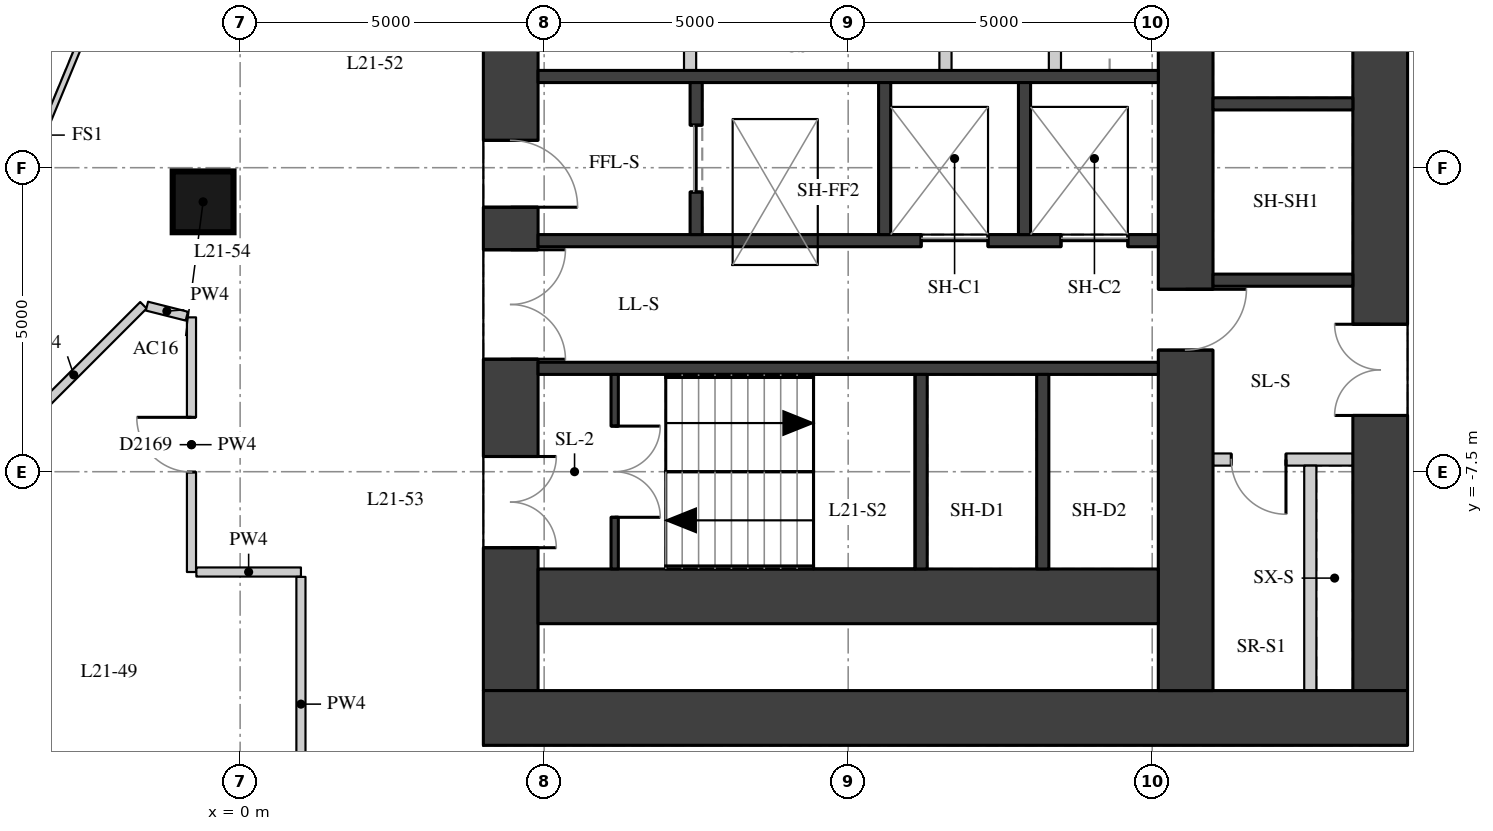
"""IFC4 building model, lengths in metres.
Left out: names, types, materials, properties, quantities, classifications, styles, units other than length and angle.
Written with IfcOpenShell. Run it as: python <this file> out.ifc"""

import sys

from ifc_helpers import new_model, si_unit, direction, frame, frame_2d, origin, origin_2d, place, context, subcontext, project, spatial, rectangle, extrude, element, fill, save


model = new_model("IFC4")
c1 = context("Model", 3, precision=1e-05, world=origin(), true_north=direction((0.0, 1.0)))
c2 = subcontext(c1, "Body", "Model", "MODEL_VIEW")
j1 = project(units=[si_unit("LENGTHUNIT", "METRE"), si_unit("PLANEANGLEUNIT", "RADIAN")], contexts=[c1])
p1 = place(None, origin())
s1 = spatial("IfcSite", under=j1, at=p1, CompositionType="ELEMENT")
p2 = place(p1, origin())
s2 = spatial("IfcBuilding", under=s1, at=p2, CompositionType="ELEMENT")
p3 = place(p2, frame((0.0, 0.0, 77.8)))
s3 = spatial("IfcBuildingStorey", under=s2, at=p3, CompositionType="ELEMENT", Elevation=77.8)
p4 = place(p3, frame((-0.609, -3.062, 0.0), z_axis=(0.0, 0.0, 1.0), x_axis=(1.0, 0.0, 0.0)))
e1 = element("IfcColumn", 1, at=p4, inside=s3, PredefinedType="COLUMN", context=c2, shape_type="SweptSolid", body=[
    extrude(rectangle(XDim=1.0, YDim=1.0, at=origin_2d()), origin(), (0.0, 0.0, 1.0), 3.3),
])
p5 = place(p3, frame((4.45, -11.1, 0.0), z_axis=(0.0, 0.0, 1.0), x_axis=(0.0, 1.0, 0.0)))
e2 = element("IfcWall", 2, at=p5, inside=s3, PredefinedType="SHEAR", context=c2, shape_type="SweptSolid", body=[
    extrude(rectangle(XDim=22.2, YDim=0.9, at=frame_2d((11.1, 0.0))), origin(), (0.0, 0.0, 1.0), 3.02),
])
p6 = place(p5, frame((2.35, 0.0, 0.0)))
e3 = element("IfcOpeningElement", 3, at=p6, cuts=e2, PredefinedType="OPENING", context=c2, shape_type="SweptSolid", body=[
    extrude(rectangle(XDim=1.5, YDim=2.1, at=frame_2d((0.75, 1.05))), frame((0.0, 0.46, 0.0), z_axis=(0.0, -1.0, 0.0), x_axis=(1.0, 0.0, 0.0)), (0.0, 0.0, 1.0), 0.92),
])
p7 = place(p5, frame((5.45, 0.0, 0.0)))
e4 = element("IfcOpeningElement", 4, at=p7, cuts=e2, PredefinedType="OPENING", context=c2, shape_type="SweptSolid", body=[
    extrude(rectangle(XDim=1.8, YDim=2.1, at=frame_2d((0.9, 1.05))), frame((0.0, 0.46, 0.0), z_axis=(0.0, -1.0, 0.0), x_axis=(1.0, 0.0, 0.0)), (0.0, 0.0, 1.0), 0.92),
])
p8 = place(p5, frame((7.95, 0.0, 0.0)))
e5 = element("IfcOpeningElement", 5, at=p8, cuts=e2, PredefinedType="OPENING", context=c2, shape_type="SweptSolid", body=[
    extrude(rectangle(XDim=1.1, YDim=2.1, at=frame_2d((0.55, 1.05))), frame((0.0, 0.46, 0.0), z_axis=(0.0, -1.0, 0.0), x_axis=(1.0, 0.0, 0.0)), (0.0, 0.0, 1.0), 0.92),
])
p9 = place(p5, frame((10.6, 0.0, 0.0)))
e6 = element("IfcOpeningElement", 6, at=p9, cuts=e2, PredefinedType="OPENING", context=c2, shape_type="SweptSolid", body=[
    extrude(rectangle(XDim=1.0, YDim=2.1, at=frame_2d((0.5, 1.05))), frame((0.0, 0.46, 0.0), z_axis=(0.0, -1.0, 0.0), x_axis=(1.0, 0.0, 0.0)), (0.0, 0.0, 1.0), 0.92),
])
p10 = place(p5, frame((13.15, 0.0, 0.0)))
e7 = element("IfcOpeningElement", 7, at=p10, cuts=e2, PredefinedType="OPENING", context=c2, shape_type="SweptSolid", body=[
    extrude(rectangle(XDim=1.1, YDim=2.1, at=frame_2d((0.55, 1.05))), frame((0.0, 0.46, 0.0), z_axis=(0.0, -1.0, 0.0), x_axis=(1.0, 0.0, 0.0)), (0.0, 0.0, 1.0), 0.92),
])
p11 = place(p5, frame((14.95, 0.0, 0.0)))
e8 = element("IfcOpeningElement", 8, at=p11, cuts=e2, PredefinedType="OPENING", context=c2, shape_type="SweptSolid", body=[
    extrude(rectangle(XDim=1.8, YDim=2.1, at=frame_2d((0.9, 1.05))), frame((0.0, 0.46, 0.0), z_axis=(0.0, -1.0, 0.0), x_axis=(1.0, 0.0, 0.0)), (0.0, 0.0, 1.0), 0.92),
])
p12 = place(p5, frame((18.35, 0.0, 0.0)))
e9 = element("IfcOpeningElement", 9, at=p12, cuts=e2, PredefinedType="OPENING", context=c2, shape_type="SweptSolid", body=[
    extrude(rectangle(XDim=1.5, YDim=2.1, at=frame_2d((0.75, 1.05))), frame((0.0, 0.46, 0.0), z_axis=(0.0, -1.0, 0.0), x_axis=(1.0, 0.0, 0.0)), (0.0, 0.0, 1.0), 0.92),
])
p13 = place(p3, frame((18.75, -11.1, 0.0), z_axis=(0.0, 0.0, 1.0), x_axis=(0.0, 1.0, 0.0)))
e10 = element("IfcWall", 10, at=p13, inside=s3, PredefinedType="SHEAR", context=c2, shape_type="SweptSolid", body=[
    extrude(rectangle(XDim=22.2, YDim=0.9, at=frame_2d((11.1, 0.0))), origin(), (0.0, 0.0, 1.0), 3.02),
])
p14 = place(p13, frame((15.925, 0.0, 0.0)))
e11 = element("IfcOpeningElement", 11, at=p14, cuts=e10, PredefinedType="OPENING", context=c2, shape_type="SweptSolid", body=[
    extrude(rectangle(XDim=1.5, YDim=2.1, at=frame_2d((0.75, 1.05))), frame((0.0, 0.46, 0.0), z_axis=(0.0, -1.0, 0.0), x_axis=(1.0, 0.0, 0.0)), (0.0, 0.0, 1.0), 0.92),
])
p15 = place(p13, frame((4.525, 0.0, 0.0)))
e12 = element("IfcOpeningElement", 12, at=p15, cuts=e10, PredefinedType="OPENING", context=c2, shape_type="SweptSolid", body=[
    extrude(rectangle(XDim=1.5, YDim=2.1, at=frame_2d((0.75, 1.05))), frame((0.0, 0.46, 0.0), z_axis=(0.0, -1.0, 0.0), x_axis=(1.0, 0.0, 0.0)), (0.0, 0.0, 1.0), 0.92),
])
p16 = place(p3, frame((4.0, -11.55, 0.0), z_axis=(0.0, 0.0, 1.0), x_axis=(1.0, 0.0, 0.0)))
e13 = element("IfcWall", 13, at=p16, inside=s3, PredefinedType="SHEAR", context=c2, shape_type="SweptSolid", body=[
    extrude(rectangle(XDim=15.2, YDim=0.9, at=frame_2d((7.6, 0.0))), origin(), (0.0, 0.0, 1.0), 3.02),
])
p17 = place(p3, frame((15.55, -11.1, 0.0), z_axis=(0.0, 0.0, 1.0), x_axis=(0.0, 1.0, 0.0)))
e14 = element("IfcWall", 14, at=p17, inside=s3, PredefinedType="SHEAR", context=c2, shape_type="SweptSolid", body=[
    extrude(rectangle(XDim=22.2, YDim=0.9, at=frame_2d((11.1, 0.0))), origin(), (0.0, 0.0, 1.0), 3.02),
])
p18 = place(p17, frame((15.6, 0.0, 0.0)))
e15 = element("IfcOpeningElement", 15, at=p18, cuts=e14, PredefinedType="OPENING", context=c2, shape_type="SweptSolid", body=[
    extrude(rectangle(XDim=1.0, YDim=2.1, at=frame_2d((0.5, 1.05))), frame((0.0, 0.46, 0.0), z_axis=(0.0, -1.0, 0.0), x_axis=(1.0, 0.0, 0.0)), (0.0, 0.0, 1.0), 0.92),
])
p19 = place(p17, frame((5.6, 0.0, 0.0)))
e16 = element("IfcOpeningElement", 16, at=p19, cuts=e14, PredefinedType="OPENING", context=c2, shape_type="SweptSolid", body=[
    extrude(rectangle(XDim=1.0, YDim=2.1, at=frame_2d((0.5, 1.05))), frame((0.0, 0.46, 0.0), z_axis=(0.0, -1.0, 0.0), x_axis=(1.0, 0.0, 0.0)), (0.0, 0.0, 1.0), 0.92),
])
p20 = place(p3, frame((4.9, -9.55, 0.0), z_axis=(0.0, 0.0, 1.0), x_axis=(1.0, 0.0, 0.0)))
e17 = element("IfcWall", 17, at=p20, inside=s3, PredefinedType="SHEAR", context=c2, shape_type="SweptSolid", body=[
    extrude(rectangle(XDim=10.2, YDim=0.9, at=frame_2d((5.1, 0.0))), origin(), (0.0, 0.0, 1.0), 3.02),
])
p21 = place(p3, frame((4.9, -1.0, 0.0), z_axis=(0.0, 0.0, 1.0), x_axis=(1.0, 0.0, 0.0)))
e18 = element("IfcWall", 18, at=p21, inside=s3, PredefinedType="SHEAR", context=c2, shape_type="SweptSolid", body=[
    extrude(rectangle(XDim=10.2, YDim=0.2, at=frame_2d((5.1, 0.0))), origin(), (0.0, 0.0, 1.0), 3.02),
])
p22 = place(p3, frame((4.9, -3.7, 0.0), z_axis=(0.0, 0.0, 1.0), x_axis=(1.0, 0.0, 0.0)))
e19 = element("IfcWall", 19, at=p22, inside=s3, PredefinedType="SHEAR", context=c2, shape_type="SweptSolid", body=[
    extrude(rectangle(XDim=10.2, YDim=0.2, at=frame_2d((5.1, 0.0))), origin(), (0.0, 0.0, 1.0), 3.02),
])
p23 = place(p22, frame((6.3, 0.0, 0.0)))
e20 = element("IfcOpeningElement", 20, at=p23, cuts=e19, PredefinedType="OPENING", context=c2, shape_type="SweptSolid", body=[
    extrude(rectangle(XDim=1.1, YDim=2.1, at=frame_2d((0.55, 1.05))), frame((0.0, 0.11, 0.0), z_axis=(0.0, -1.0, 0.0), x_axis=(1.0, 0.0, 0.0)), (0.0, 0.0, 1.0), 0.22),
])
p24 = place(p22, frame((8.6, 0.0, 0.0)))
e21 = element("IfcOpeningElement", 21, at=p24, cuts=e19, PredefinedType="OPENING", context=c2, shape_type="SweptSolid", body=[
    extrude(rectangle(XDim=1.1, YDim=2.1, at=frame_2d((0.55, 1.05))), frame((0.0, 0.11, 0.0), z_axis=(0.0, -1.0, 0.0), x_axis=(1.0, 0.0, 0.0)), (0.0, 0.0, 1.0), 0.22),
])
p25 = place(p3, frame((4.9, -5.8, 0.0), z_axis=(0.0, 0.0, 1.0), x_axis=(1.0, 0.0, 0.0)))
e22 = element("IfcWall", 22, at=p25, inside=s3, PredefinedType="SHEAR", context=c2, shape_type="SweptSolid", body=[
    extrude(rectangle(XDim=10.2, YDim=0.2, at=frame_2d((5.1, 0.0))), origin(), (0.0, 0.0, 1.0), 3.02),
])
for number, where, z_axis, x_axis in (
    (23, (11.2, -9.1, 0.0), (0.0, 0.0, 1.0), (0.0, 1.0, 0.0)),
    (24, (13.2, -9.1, 0.0), (0.0, 0.0, 1.0), (0.0, 1.0, 0.0)),
):
    element("IfcWall", number, at=place(p3, frame(where, z_axis=z_axis, x_axis=x_axis)), inside=s3, PredefinedType="SHEAR", context=c2, shape_type="SweptSolid", body=[
        extrude(rectangle(XDim=3.2, YDim=0.2, at=frame_2d((1.6, 0.0))), origin(), (0.0, 0.0, 1.0), 3.02),
    ])
p26 = place(p3, frame((7.5, -3.6, 0.0), z_axis=(0.0, 0.0, 1.0), x_axis=(0.0, 1.0, 0.0)))
e25 = element("IfcWall", 25, at=p26, inside=s3, PredefinedType="SHEAR", context=c2, shape_type="SweptSolid", body=[
    extrude(rectangle(XDim=2.5, YDim=0.2, at=frame_2d((1.25, 0.0))), origin(), (0.0, 0.0, 1.0), 3.02),
])
p27 = place(p26, frame((0.7, 0.0, 0.0)))
e26 = element("IfcOpeningElement", 26, at=p27, cuts=e25, PredefinedType="OPENING", context=c2, shape_type="SweptSolid", body=[
    extrude(rectangle(XDim=1.1, YDim=2.1, at=frame_2d((0.55, 1.05))), frame((0.0, 0.11, 0.0), z_axis=(0.0, -1.0, 0.0), x_axis=(1.0, 0.0, 0.0)), (0.0, 0.0, 1.0), 0.22),
])
for number, where, z_axis, x_axis in (
    (27, (10.6, -3.6, 0.0), (0.0, 0.0, 1.0), (0.0, 1.0, 0.0)),
    (28, (12.9, -3.6, 0.0), (0.0, 0.0, 1.0), (0.0, 1.0, 0.0)),
):
    element("IfcWall", number, at=place(p3, frame(where, z_axis=z_axis, x_axis=x_axis)), inside=s3, PredefinedType="SHEAR", context=c2, shape_type="SweptSolid", body=[
        extrude(rectangle(XDim=2.5, YDim=0.2, at=frame_2d((1.25, 0.0))), origin(), (0.0, 0.0, 1.0), 3.02),
    ])
p28 = place(p3, frame((6.16, -9.1, 0.0), z_axis=(0.0, 0.0, 1.0), x_axis=(0.0, 1.0, 0.0)))
e29 = element("IfcWall", 29, at=p28, inside=s3, PredefinedType="SHEAR", context=c2, shape_type="SweptSolid", body=[
    extrude(rectangle(XDim=3.2, YDim=0.12, at=frame_2d((1.6, 0.0))), origin(), (0.0, 0.0, 1.0), 3.02),
])
p29 = place(p28, frame((0.85, 0.0, 0.0)))
e30 = element("IfcOpeningElement", 30, at=p29, cuts=e29, PredefinedType="OPENING", context=c2, shape_type="SweptSolid", body=[
    extrude(rectangle(XDim=1.5, YDim=2.1, at=frame_2d((0.75, 1.05))), frame((0.0, 0.07, 0.0), z_axis=(0.0, -1.0, 0.0), x_axis=(1.0, 0.0, 0.0)), (0.0, 0.0, 1.0), 0.14),
])
p30 = place(p3, frame((7.4, -0.9, 0.0), z_axis=(0.0, 0.0, 1.0), x_axis=(0.0, 1.0, 0.0)))
e31 = element("IfcWall", 31, at=p30, inside=s3, PredefinedType="PARTITIONING", context=c2, shape_type="SweptSolid", body=[
    extrude(rectangle(XDim=1.8, YDim=0.2, at=frame_2d((0.9, 0.0))), origin(), (0.0, 0.0, 1.0), 3.02),
])
p31 = place(p30, frame((0.45, 0.0, 0.0)))
e32 = element("IfcOpeningElement", 32, at=p31, cuts=e31, PredefinedType="OPENING", context=c2, shape_type="SweptSolid", body=[
    extrude(rectangle(XDim=0.9, YDim=2.1, at=frame_2d((0.45, 1.05))), frame((0.0, 0.11, 0.0), z_axis=(0.0, -1.0, 0.0), x_axis=(1.0, 0.0, 0.0)), (0.0, 0.0, 1.0), 0.22),
])
for number, where, z_axis, x_axis in (
    (33, (11.6, -0.9, 0.0), (0.0, 0.0, 1.0), (0.0, 1.0, 0.0)),
    (34, (13.4, -0.9, 0.0), (0.0, 0.0, 1.0), (0.0, 1.0, 0.0)),
):
    element("IfcWall", number, at=place(p3, frame(where, z_axis=z_axis, x_axis=x_axis)), inside=s3, PredefinedType="PARTITIONING", context=c2, shape_type="SweptSolid", body=[
        extrude(rectangle(XDim=1.8, YDim=0.2, at=frame_2d((0.9, 0.0))), origin(), (0.0, 0.0, 1.0), 3.02),
    ])
for number, where, z_axis, x_axis in (
    (35, (16.0, -4.35, 0.0), (0.0, 0.0, 1.0), (1.0, 0.0, 0.0)),
    (36, (16.0, -1.45, 0.0), (0.0, 0.0, 1.0), (1.0, 0.0, 0.0)),
):
    element("IfcWall", number, at=place(p3, frame(where, z_axis=z_axis, x_axis=x_axis)), inside=s3, PredefinedType="SHEAR", context=c2, shape_type="SweptSolid", body=[
        extrude(rectangle(XDim=2.3, YDim=0.2, at=frame_2d((1.15, 0.0))), origin(), (0.0, 0.0, 1.0), 3.02),
    ])
p32 = place(p3, frame((16.0, -7.3, 0.0), z_axis=(0.0, 0.0, 1.0), x_axis=(1.0, 0.0, 0.0)))
e37 = element("IfcWall", 37, at=p32, inside=s3, PredefinedType="PARTITIONING", context=c2, shape_type="SweptSolid", body=[
    extrude(rectangle(XDim=2.3, YDim=0.2, at=frame_2d((1.15, 0.0))), origin(), (0.0, 0.0, 1.0), 3.02),
])
p33 = place(p32, frame((0.3, 0.0, 0.0)))
e38 = element("IfcOpeningElement", 38, at=p33, cuts=e37, PredefinedType="OPENING", context=c2, shape_type="SweptSolid", body=[
    extrude(rectangle(XDim=0.9, YDim=2.1, at=frame_2d((0.45, 1.05))), frame((0.0, 0.11, 0.0), z_axis=(0.0, -1.0, 0.0), x_axis=(1.0, 0.0, 0.0)), (0.0, 0.0, 1.0), 0.22),
])
p34 = place(p3, frame((17.6, -11.1, 0.0), z_axis=(0.0, 0.0, 1.0), x_axis=(0.0, 1.0, 0.0)))
e39 = element("IfcWall", 39, at=p34, inside=s3, PredefinedType="PARTITIONING", context=c2, shape_type="SweptSolid", body=[
    extrude(rectangle(XDim=3.7, YDim=0.2, at=frame_2d((1.85, 0.0))), origin(), (0.0, 0.0, 1.0), 3.02),
])
p35 = place(p3, frame((-0.8, -4.961, 0.0), z_axis=(0.0, 0.0, 1.0), x_axis=(0.0, -1.0, 0.0)))
e40 = element("IfcWall", 40, at=p35, inside=s3, PredefinedType="PARTITIONING", context=c2, shape_type="SweptSolid", body=[
    extrude(rectangle(XDim=4.188, YDim=0.15, at=frame_2d((2.094, 0.0))), origin(), (0.0, 0.0, 1.0), 3.02),
])
p36 = place(p35, frame((1.644, 0.0, 0.0)))
e41 = element("IfcOpeningElement", 41, at=p36, cuts=e40, PredefinedType="OPENING", context=c2, shape_type="SweptSolid", body=[
    extrude(rectangle(XDim=0.9, YDim=2.1, at=frame_2d((0.45, 1.05))), frame((0.0, 0.085, 0.0), z_axis=(0.0, -1.0, 0.0), x_axis=(1.0, 0.0, 0.0)), (0.0, 0.0, 1.0), 0.17),
])
p37 = place(p3, frame((-0.72, -9.15, 0.0), z_axis=(0.0, 0.0, 1.0), x_axis=(1.0, 0.0, 0.0)))
e42 = element("IfcWall", 42, at=p37, inside=s3, PredefinedType="PARTITIONING", context=c2, shape_type="SweptSolid", body=[
    extrude(rectangle(XDim=1.72, YDim=0.15, at=frame_2d((0.86, 0.0))), origin(), (0.0, 0.0, 1.0), 3.02),
])
p38 = place(p3, frame((1.0, -9.23, 0.0), z_axis=(0.0, 0.0, 1.0), x_axis=(0.0, -1.0, 0.0)))
e43 = element("IfcWall", 43, at=p38, inside=s3, PredefinedType="PARTITIONING", context=c2, shape_type="SweptSolid", body=[
    extrude(rectangle(XDim=4.186, YDim=0.15, at=frame_2d((2.093, 0.0))), origin(), (0.0, 0.0, 1.0), 3.02),
])
p39 = place(p3, frame((-3.882, -7.055, 0.0), z_axis=(0.0, 0.0, 1.0), x_axis=(0.707069126061, 0.707144434307, 0.0)))
e44 = element("IfcWall", 44, at=p39, inside=s3, PredefinedType="PARTITIONING", context=c2, shape_type="SweptSolid", body=[
    extrude(rectangle(XDim=3.242, YDim=0.15, at=frame_2d((1.621, 0.0))), origin(), (0.0, 0.0, 1.0), 3.02),
])
p40 = place(p3, frame((-1.532, -4.777, 0.0), z_axis=(0.0, 0.0, 1.0), x_axis=(0.969694394352, -0.244321062461, 0.0)))
e45 = element("IfcWall", 45, at=p40, inside=s3, PredefinedType="PARTITIONING", context=c2, shape_type="SweptSolid", body=[
    extrude(rectangle(XDim=0.676, YDim=0.15, at=frame_2d((0.338, 0.0))), origin(), (0.0, 0.0, 1.0), 3.02),
])
p41 = place(p3, frame((-2.446, 0.0, 0.0), z_axis=(0.0, 0.0, 1.0), x_axis=(-0.382730523909, -0.923860025149, 0.0)))
e46 = element("IfcWall", 46, at=p41, inside=s3, PredefinedType="PARTITIONING", context=c2, shape_type="SweptSolid", body=[
    extrude(rectangle(XDim=4.251, YDim=0.1, at=frame_2d((2.125, 0.0))), origin(), (0.0, 0.0, 1.0), 3.02),
])
p42 = place(p6, origin())
e47 = element("IfcDoor", 47, at=p42, inside=s3, OperationType="DOUBLE_DOOR_SINGLE_SWING", PredefinedType="DOOR", context=c2, shape_type="SweptSolid", body=[
    extrude(rectangle(XDim=1.5, YDim=2.1, at=frame_2d((0.75, 1.05))), frame((0.0, 0.025, 0.0), z_axis=(0.0, -1.0, 0.0), x_axis=(1.0, 0.0, 0.0)), (0.0, 0.0, 1.0), 0.05),
])
fill(e3, e47)
p43 = place(p7, origin())
e48 = element("IfcDoor", 48, at=p43, inside=s3, OperationType="DOUBLE_DOOR_SINGLE_SWING", PredefinedType="DOOR", context=c2, shape_type="SweptSolid", body=[
    extrude(rectangle(XDim=1.8, YDim=2.1, at=frame_2d((0.9, 1.05))), frame((0.0, 0.025, 0.0), z_axis=(0.0, -1.0, 0.0), x_axis=(1.0, 0.0, 0.0)), (0.0, 0.0, 1.0), 0.05),
])
fill(e4, e48)
p44 = place(p8, origin())
e49 = element("IfcDoor", 49, at=p44, inside=s3, OperationType="SINGLE_SWING_RIGHT", PredefinedType="DOOR", context=c2, shape_type="SweptSolid", body=[
    extrude(rectangle(XDim=1.1, YDim=2.1, at=frame_2d((0.55, 1.05))), frame((0.0, 0.025, 0.0), z_axis=(0.0, -1.0, 0.0), x_axis=(1.0, 0.0, 0.0)), (0.0, 0.0, 1.0), 0.05),
])
fill(e5, e49)
p45 = place(p15, origin())
e50 = element("IfcDoor", 50, at=p45, inside=s3, OperationType="DOUBLE_DOOR_SINGLE_SWING", PredefinedType="DOOR", context=c2, shape_type="SweptSolid", body=[
    extrude(rectangle(XDim=1.5, YDim=2.1, at=frame_2d((0.75, 1.05))), frame((0.0, 0.025, 0.0), z_axis=(0.0, -1.0, 0.0), x_axis=(1.0, 0.0, 0.0)), (0.0, 0.0, 1.0), 0.05),
])
fill(e12, e50)
p46 = place(p29, origin())
e51 = element("IfcDoor", 51, at=p46, inside=s3, OperationType="DOUBLE_DOOR_SINGLE_SWING", PredefinedType="DOOR", context=c2, shape_type="SweptSolid", body=[
    extrude(rectangle(XDim=1.5, YDim=2.1, at=frame_2d((0.75, 1.05))), frame((0.0, 0.025, 0.0), z_axis=(0.0, -1.0, 0.0), x_axis=(1.0, 0.0, 0.0)), (0.0, 0.0, 1.0), 0.05),
])
fill(e30, e51)
p47 = place(p23, origin())
e52 = element("IfcDoor", 52, at=p47, inside=s3, OperationType="DOUBLE_DOOR_SLIDING", PredefinedType="DOOR", context=c2, shape_type="SweptSolid", body=[
    extrude(rectangle(XDim=1.1, YDim=2.1, at=frame_2d((0.55, 1.05))), frame((0.0, 0.025, 0.0), z_axis=(0.0, -1.0, 0.0), x_axis=(1.0, 0.0, 0.0)), (0.0, 0.0, 1.0), 0.05),
])
fill(e20, e52)
p48 = place(p24, origin())
e53 = element("IfcDoor", 53, at=p48, inside=s3, OperationType="DOUBLE_DOOR_SLIDING", PredefinedType="DOOR", context=c2, shape_type="SweptSolid", body=[
    extrude(rectangle(XDim=1.1, YDim=2.1, at=frame_2d((0.55, 1.05))), frame((0.0, 0.025, 0.0), z_axis=(0.0, -1.0, 0.0), x_axis=(1.0, 0.0, 0.0)), (0.0, 0.0, 1.0), 0.05),
])
fill(e21, e53)
p49 = place(p27, origin())
e54 = element("IfcDoor", 54, at=p49, inside=s3, OperationType="DOUBLE_DOOR_SLIDING", PredefinedType="DOOR", context=c2, shape_type="SweptSolid", body=[
    extrude(rectangle(XDim=1.1, YDim=2.1, at=frame_2d((0.55, 1.05))), frame((0.0, 0.025, 0.0), z_axis=(0.0, -1.0, 0.0), x_axis=(1.0, 0.0, 0.0)), (0.0, 0.0, 1.0), 0.05),
])
fill(e26, e54)
p50 = place(p19, origin())
e55 = element("IfcDoor", 55, at=p50, inside=s3, OperationType="SINGLE_SWING_LEFT", PredefinedType="DOOR", context=c2, shape_type="SweptSolid", body=[
    extrude(rectangle(XDim=1.0, YDim=2.1, at=frame_2d((0.5, 1.05))), frame((0.0, 0.025, 0.0), z_axis=(0.0, -1.0, 0.0), x_axis=(1.0, 0.0, 0.0)), (0.0, 0.0, 1.0), 0.05),
])
fill(e16, e55)
p51 = place(p33, origin())
e56 = element("IfcDoor", 56, at=p51, inside=s3, OperationType="SINGLE_SWING_LEFT", PredefinedType="DOOR", context=c2, shape_type="SweptSolid", body=[
    extrude(rectangle(XDim=0.9, YDim=2.1, at=frame_2d((0.45, 1.05))), frame((0.0, 0.025, 0.0), z_axis=(0.0, -1.0, 0.0), x_axis=(1.0, 0.0, 0.0)), (0.0, 0.0, 1.0), 0.05),
])
fill(e38, e56)
p52 = place(p36, origin())
e57 = element("IfcDoor", 57, at=p52, inside=s3, OperationType="SINGLE_SWING_RIGHT", PredefinedType="DOOR", context=c2, shape_type="SweptSolid", body=[
    extrude(rectangle(XDim=0.9, YDim=2.1, at=frame_2d((0.45, 1.05))), frame((0.0, 0.025, 0.0), z_axis=(0.0, -1.0, 0.0), x_axis=(1.0, 0.0, 0.0)), (0.0, 0.0, 1.0), 0.05),
])
fill(e41, e57)
save(model, sys.argv[1])
